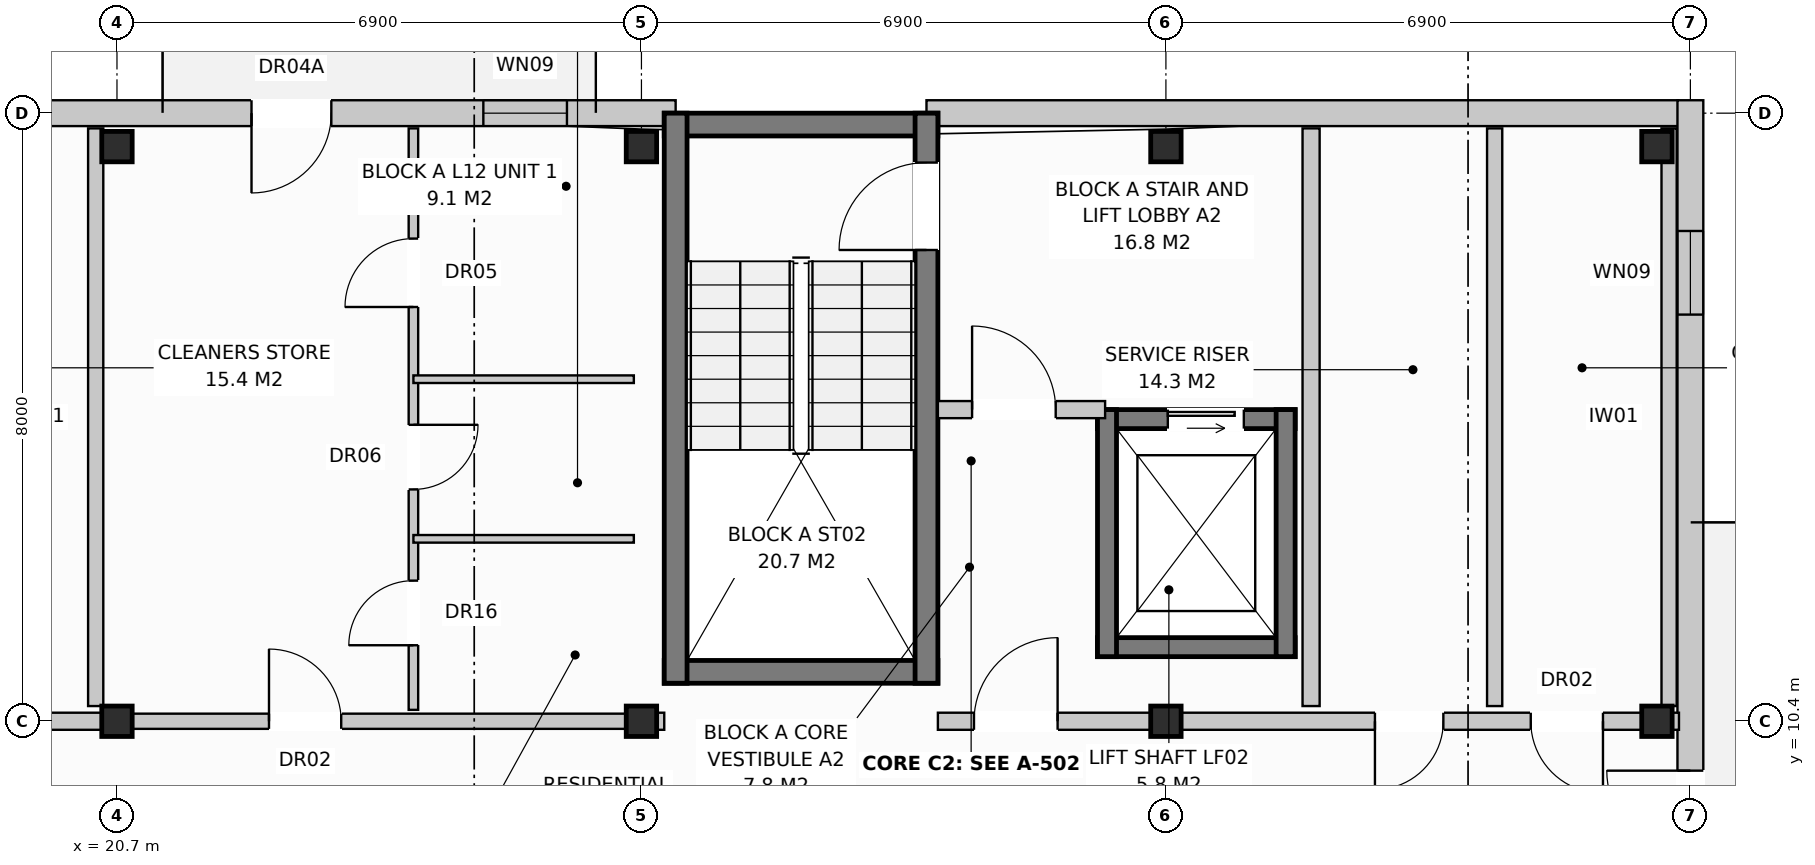
"""IFC4 building model, lengths in metres.
Left out: names, types, materials, properties, quantities, classifications, styles, units other than length and angle.
Written with IfcOpenShell. Run it as: python <this file> out.ifc"""

import sys

from ifc_helpers import new_model, si_unit, direction, frame, frame_2d, origin, origin_with_axes, origin_2d, place, context, subcontext, project, spatial, rectangle, extrude, element, fill, save


model = new_model("IFC4")
c1 = context("Model", 3, precision=1e-05, world=origin(), true_north=direction((0.0, 1.0)))
c2 = subcontext(c1, "Body", "Model", "MODEL_VIEW")
j1 = project(units=[si_unit("LENGTHUNIT", "METRE"), si_unit("PLANEANGLEUNIT", "RADIAN")], contexts=[c1])
p1 = place(None, origin())
s1 = spatial("IfcSite", under=j1, at=p1, CompositionType="ELEMENT")
p2 = place(p1, origin())
s2 = spatial("IfcBuilding", under=s1, at=p2, CompositionType="ELEMENT")
p3 = place(p2, frame((0.0, 0.0, 40.0)))
s3 = spatial("IfcBuildingStorey", under=s2, at=p3, CompositionType="ELEMENT", Elevation=40.0)
for number, where, z_axis, x_axis in (
    (1, (20.7, 10.4, 0.0), (0.0, 0.0, 1.0), (1.0, 0.0, 0.0)),
    (2, (20.7, 17.96, 0.0), (0.0, 0.0, 1.0), (1.0, 0.0, 0.0)),
    (3, (27.6, 10.4, 0.0), (0.0, 0.0, 1.0), (1.0, 0.0, 0.0)),
    (4, (27.6, 17.96, 0.0), (0.0, 0.0, 1.0), (1.0, 0.0, 0.0)),
    (5, (34.5, 10.4, 0.0), (0.0, 0.0, 1.0), (1.0, 0.0, 0.0)),
    (6, (34.5, 17.96, 0.0), (0.0, 0.0, 1.0), (1.0, 0.0, 0.0)),
    (7, (40.96, 10.4, 0.0), (0.0, 0.0, 1.0), (1.0, 0.0, 0.0)),
    (8, (40.96, 17.96, 0.0), (0.0, 0.0, 1.0), (1.0, 0.0, 0.0)),
):
    element("IfcColumn", number, at=place(p3, frame(where, z_axis=z_axis, x_axis=x_axis)), inside=s3, PredefinedType="COLUMN", context=c2, shape_type="SweptSolid", body=[
        extrude(rectangle(XDim=0.4, YDim=0.4, at=origin_2d()), origin(), (0.0, 0.0, 1.0), 3.2),
    ])
p4 = place(p3, frame((10.65, 18.4, 0.0), z_axis=(0.0, 0.0, 1.0), x_axis=(1.0, 0.0, 0.0)))
e9 = element("IfcWall", 9, at=p4, inside=s3, PredefinedType="STANDARD", context=c2, shape_type="SweptSolid", body=[
    extrude(rectangle(XDim=17.4, YDim=0.34, at=frame_2d((8.7, 0.0))), origin(), (0.0, 0.0, 1.0), 2.97),
])
p5 = place(p4, frame((11.82, 0.0, 0.0)))
e10 = element("IfcOpeningElement", 10, at=p5, cuts=e9, PredefinedType="OPENING", context=c2, shape_type="SweptSolid", body=[
    extrude(rectangle(XDim=1.05, YDim=2.12, at=frame_2d((0.525, 1.06))), frame((0.0, 0.182, 0.0), z_axis=(0.0, -1.0, 0.0), x_axis=(1.0, 0.0, 0.0)), (0.0, 0.0, 1.0), 0.364),
])
p6 = place(p4, frame((14.87, 0.0, 0.72)))
e11 = element("IfcOpeningElement", 11, at=p6, cuts=e9, PredefinedType="OPENING", context=c2, shape_type="SweptSolid", body=[
    extrude(rectangle(XDim=1.1, YDim=1.5, at=frame_2d((0.55, 0.75))), frame((0.0, 0.182, 0.0), z_axis=(0.0, -1.0, 0.0), x_axis=(1.0, 0.0, 0.0)), (0.0, 0.0, 1.0), 0.364),
])
p7 = place(p3, frame((31.35, 18.4, 0.0), z_axis=(0.0, 0.0, 1.0), x_axis=(1.0, 0.0, 0.0)))
e12 = element("IfcWall", 12, at=p7, inside=s3, PredefinedType="STANDARD", context=c2, shape_type="SweptSolid", body=[
    extrude(rectangle(XDim=9.89, YDim=0.34, at=frame_2d((4.945, 0.0))), origin(), (0.0, 0.0, 1.0), 2.97),
])
p8 = place(p3, frame((41.4, -0.17, 0.0), z_axis=(0.0, 0.0, 1.0), x_axis=(0.0, 1.0, 0.0)))
e13 = element("IfcWall", 13, at=p8, inside=s3, PredefinedType="STANDARD", context=c2, shape_type="SweptSolid", body=[
    extrude(rectangle(XDim=18.74, YDim=0.34, at=frame_2d((9.37, 0.0))), origin(), (0.0, 0.0, 1.0), 2.97),
])
p9 = place(p8, frame((8.82, 0.0, 0.0)))
e14 = element("IfcOpeningElement", 14, at=p9, cuts=e13, PredefinedType="OPENING", context=c2, shape_type="SweptSolid", body=[
    extrude(rectangle(XDim=1.1, YDim=2.1, at=frame_2d((0.55, 1.05))), frame((0.0, 0.182, 0.0), z_axis=(0.0, -1.0, 0.0), x_axis=(1.0, 0.0, 0.0)), (0.0, 0.0, 1.0), 0.364),
])
p10 = place(p8, frame((1.72, 0.0, 0.72)))
e15 = element("IfcOpeningElement", 15, at=p10, cuts=e13, PredefinedType="OPENING", context=c2, shape_type="SweptSolid", body=[
    extrude(rectangle(XDim=1.1, YDim=1.5, at=frame_2d((0.55, 0.75))), frame((0.0, 0.182, 0.0), z_axis=(0.0, -1.0, 0.0), x_axis=(1.0, 0.0, 0.0)), (0.0, 0.0, 1.0), 0.364),
])
p11 = place(p8, frame((15.92, 0.0, 0.72)))
e16 = element("IfcOpeningElement", 16, at=p11, cuts=e13, PredefinedType="OPENING", context=c2, shape_type="SweptSolid", body=[
    extrude(rectangle(XDim=1.1, YDim=1.5, at=frame_2d((0.55, 0.75))), frame((0.0, 0.182, 0.0), z_axis=(0.0, -1.0, 0.0), x_axis=(1.0, 0.0, 0.0)), (0.0, 0.0, 1.0), 0.364),
])
p12 = place(p3, frame((20.42, 10.6, 0.0), z_axis=(0.0, 0.0, 1.0), x_axis=(0.0, 1.0, 0.0)))
e17 = element("IfcWall", 17, at=p12, inside=s3, PredefinedType="PARTITIONING", context=c2, shape_type="SweptSolid", body=[
    extrude(rectangle(XDim=7.6, YDim=0.2, at=frame_2d((3.8, 0.0))), origin(), (0.0, 0.0, 1.0), 2.97),
])
p13 = place(p3, frame((10.8, 10.4, 0.0), z_axis=(0.0, 0.0, 1.0), x_axis=(1.0, 0.0, 0.0)))
e18 = element("IfcWall", 18, at=p13, inside=s3, PredefinedType="PARTITIONING", context=c2, shape_type="SweptSolid", body=[
    extrude(rectangle(XDim=9.9, YDim=0.225, at=frame_2d((4.95, 0.0))), origin(), (0.0, 0.0, 1.0), 2.41),
])
p14 = place(p13, frame((0.475, 0.0, 0.0)))
e19 = element("IfcOpeningElement", 19, at=p14, cuts=e18, PredefinedType="OPENING", context=c2, shape_type="SweptSolid", body=[
    extrude(rectangle(XDim=1.1, YDim=2.15, at=frame_2d((0.55, 1.075))), frame((0.0, 0.125, 0.0), z_axis=(0.0, -1.0, 0.0), x_axis=(1.0, 0.0, 0.0)), (0.0, 0.0, 1.0), 0.249),
])
p15 = place(p13, frame((5.75, 0.0, 0.0)))
e20 = element("IfcOpeningElement", 20, at=p15, cuts=e18, PredefinedType="OPENING", context=c2, shape_type="SweptSolid", body=[
    extrude(rectangle(XDim=0.9, YDim=2.1, at=frame_2d((0.45, 1.05))), frame((0.0, 0.125, 0.0), z_axis=(0.0, -1.0, 0.0), x_axis=(1.0, 0.0, 0.0)), (0.0, 0.0, 1.0), 0.249),
])
p16 = place(p13, frame((7.8, 0.0, 0.0)))
e21 = element("IfcOpeningElement", 21, at=p16, cuts=e18, PredefinedType="OPENING", context=c2, shape_type="SweptSolid", body=[
    extrude(rectangle(XDim=0.95, YDim=2.15, at=frame_2d((0.475, 1.075))), frame((0.0, 0.125, 0.0), z_axis=(0.0, -1.0, 0.0), x_axis=(1.0, 0.0, 0.0)), (0.0, 0.0, 1.0), 0.249),
])
for number, where, z_axis, x_axis in (
    (22, (27.9, 18.25, 0.0), (0.0, 0.0, 1.0), (1.0, 0.0, 0.0)),
    (23, (27.9, 11.05, 0.0), (0.0, 0.0, 1.0), (1.0, 0.0, 0.0)),
):
    element("IfcWall", number, at=place(p3, frame(where, z_axis=z_axis, x_axis=x_axis)), inside=s3, PredefinedType="SHEAR", context=c2, shape_type="SweptSolid", body=[
        extrude(rectangle(XDim=3.6, YDim=0.3, at=frame_2d((1.8, 0.0))), origin(), (0.0, 0.0, 1.0), 2.97),
    ])
p17 = place(p3, frame((28.05, 10.9, 0.0), z_axis=(0.0, 0.0, 1.0), x_axis=(0.0, 1.0, 0.0)))
e24 = element("IfcWall", 24, at=p17, inside=s3, PredefinedType="SHEAR", context=c2, shape_type="SweptSolid", body=[
    extrude(rectangle(XDim=7.5, YDim=0.3, at=frame_2d((3.75, 0.0))), origin(), (0.0, 0.0, 1.0), 2.97),
])
p18 = place(p3, frame((31.35, 10.9, 0.0), z_axis=(0.0, 0.0, 1.0), x_axis=(0.0, 1.0, 0.0)))
e25 = element("IfcWall", 25, at=p18, inside=s3, PredefinedType="SHEAR", context=c2, shape_type="SweptSolid", body=[
    extrude(rectangle(XDim=7.5, YDim=0.3, at=frame_2d((3.75, 0.0))), origin(), (0.0, 0.0, 1.0), 2.97),
])
p19 = place(p18, frame((5.7, 0.0, 0.0)))
e26 = element("IfcOpeningElement", 26, at=p19, cuts=e25, PredefinedType="OPENING", context=c2, shape_type="SweptSolid", body=[
    extrude(rectangle(XDim=1.15, YDim=2.15, at=frame_2d((0.575, 1.075))), frame((0.0, 0.162, 0.0), z_axis=(0.0, -1.0, 0.0), x_axis=(1.0, 0.0, 0.0)), (0.0, 0.0, 1.0), 0.324),
])
p20 = place(p3, frame((33.6, 14.375, 0.0), z_axis=(0.0, 0.0, 1.0), x_axis=(1.0, 0.0, 0.0)))
e27 = element("IfcWall", 27, at=p20, inside=s3, PredefinedType="SHEAR", context=c2, shape_type="SweptSolid", body=[
    extrude(rectangle(XDim=2.6, YDim=0.25, at=frame_2d((1.3, 0.0))), origin(), (0.0, 0.0, 1.0), 2.97),
])
p21 = place(p20, frame((0.925, 0.0, 0.0)))
e28 = element("IfcOpeningElement", 28, at=p21, cuts=e27, PredefinedType="OPENING", context=c2, shape_type="SweptSolid", body=[
    extrude(rectangle(XDim=1.0, YDim=2.1, at=frame_2d((0.5, 1.05))), frame((0.0, 0.137, 0.0), z_axis=(0.0, -1.0, 0.0), x_axis=(1.0, 0.0, 0.0)), (0.0, 0.0, 1.0), 0.274),
])
p22 = place(p3, frame((33.6, 11.375, 0.0), z_axis=(0.0, 0.0, 1.0), x_axis=(1.0, 0.0, 0.0)))
e29 = element("IfcWall", 29, at=p22, inside=s3, PredefinedType="SHEAR", context=c2, shape_type="SweptSolid", body=[
    extrude(rectangle(XDim=2.6, YDim=0.25, at=frame_2d((1.3, 0.0))), origin(), (0.0, 0.0, 1.0), 2.97),
])
for number, where, z_axis, x_axis in (
    (30, (33.725, 11.25, 0.0), (0.0, 0.0, 1.0), (0.0, 1.0, 0.0)),
    (31, (36.075, 11.25, 0.0), (0.0, 0.0, 1.0), (0.0, 1.0, 0.0)),
):
    element("IfcWall", number, at=place(p3, frame(where, z_axis=z_axis, x_axis=x_axis)), inside=s3, PredefinedType="SHEAR", context=c2, shape_type="SweptSolid", body=[
        extrude(rectangle(XDim=3.25, YDim=0.25, at=frame_2d((1.625, 0.0))), origin(), (0.0, 0.0, 1.0), 2.97),
    ])
p23 = place(p3, frame((36.41, 10.6, 0.0), z_axis=(0.0, 0.0, 1.0), x_axis=(0.0, 1.0, 0.0)))
e32 = element("IfcWall", 32, at=p23, inside=s3, PredefinedType="PARTITIONING", context=c2, shape_type="SweptSolid", body=[
    extrude(rectangle(XDim=7.6, YDim=0.225, at=frame_2d((3.8, 0.0))), origin(), (0.0, 0.0, 1.0), 2.59),
])
p24 = place(p3, frame((31.5, 14.5, 0.0), z_axis=(0.0, 0.0, 1.0), x_axis=(1.0, 0.0, 0.0)))
e33 = element("IfcWall", 33, at=p24, inside=s3, PredefinedType="PARTITIONING", context=c2, shape_type="SweptSolid", body=[
    extrude(rectangle(XDim=2.2, YDim=0.225, at=frame_2d((1.1, 0.0))), origin(), (0.0, 0.0, 1.0), 2.97),
])
p25 = place(p24, frame((0.45, 0.0, 0.0)))
e34 = element("IfcOpeningElement", 34, at=p25, cuts=e33, PredefinedType="OPENING", context=c2, shape_type="SweptSolid", body=[
    extrude(rectangle(XDim=1.1, YDim=2.15, at=frame_2d((0.55, 1.075))), frame((0.0, 0.125, 0.0), z_axis=(0.0, -1.0, 0.0), x_axis=(1.0, 0.0, 0.0)), (0.0, 0.0, 1.0), 0.249),
])
p26 = place(p3, frame((27.6, 10.4, 0.0), z_axis=(0.0, 0.0, 1.0), x_axis=(1.0, 0.0, 0.0)))
e35 = element("IfcWall", 35, at=p26, inside=s3, PredefinedType="PARTITIONING", context=c2, shape_type="SweptSolid", body=[
    extrude(rectangle(XDim=0.3, YDim=0.225, at=frame_2d((0.15, 0.0))), origin(), (0.0, 0.0, 1.0), 2.97),
])
p27 = place(p3, frame((38.825, 10.6, 0.0), z_axis=(0.0, 0.0, 1.0), x_axis=(0.0, 1.0, 0.0)))
e36 = element("IfcWall", 36, at=p27, inside=s3, PredefinedType="PARTITIONING", context=c2, shape_type="SweptSolid", body=[
    extrude(rectangle(XDim=7.6, YDim=0.2, at=frame_2d((3.8, 0.0))), origin(), (0.0, 0.0, 1.0), 2.97),
])
p28 = place(p3, frame((41.12, 10.6, 0.0), z_axis=(0.0, 0.0, 1.0), x_axis=(0.0, 1.0, 0.0)))
e37 = element("IfcWall", 37, at=p28, inside=s3, PredefinedType="PARTITIONING", context=c2, shape_type="SweptSolid", body=[
    extrude(rectangle(XDim=7.6, YDim=0.2, at=frame_2d((3.8, 0.0))), origin(), (0.0, 0.0, 1.0), 2.41),
])
p29 = place(p3, frame((31.5, 10.4, 0.0), z_axis=(0.0, 0.0, 1.0), x_axis=(1.0, 0.0, 0.0)))
e38 = element("IfcWall", 38, at=p29, inside=s3, PredefinedType="PARTITIONING", context=c2, shape_type="SweptSolid", body=[
    extrude(rectangle(XDim=9.75, YDim=0.225, at=frame_2d((4.875, 0.0))), origin(), (0.0, 0.0, 1.0), 2.41),
])
p30 = place(p29, frame((0.475, 0.0, 0.0)))
e39 = element("IfcOpeningElement", 39, at=p30, cuts=e38, PredefinedType="OPENING", context=c2, shape_type="SweptSolid", body=[
    extrude(rectangle(XDim=1.1, YDim=2.15, at=frame_2d((0.55, 1.075))), frame((0.0, 0.125, 0.0), z_axis=(0.0, -1.0, 0.0), x_axis=(1.0, 0.0, 0.0)), (0.0, 0.0, 1.0), 0.249),
])
p31 = place(p29, frame((5.75, 0.0, 0.0)))
e40 = element("IfcOpeningElement", 40, at=p31, cuts=e38, PredefinedType="OPENING", context=c2, shape_type="SweptSolid", body=[
    extrude(rectangle(XDim=0.9, YDim=2.1, at=frame_2d((0.45, 1.05))), frame((0.0, 0.125, 0.0), z_axis=(0.0, -1.0, 0.0), x_axis=(1.0, 0.0, 0.0)), (0.0, 0.0, 1.0), 0.249),
])
p32 = place(p29, frame((7.8, 0.0, 0.0)))
e41 = element("IfcOpeningElement", 41, at=p32, cuts=e38, PredefinedType="OPENING", context=c2, shape_type="SweptSolid", body=[
    extrude(rectangle(XDim=0.95, YDim=2.15, at=frame_2d((0.475, 1.075))), frame((0.0, 0.125, 0.0), z_axis=(0.0, -1.0, 0.0), x_axis=(1.0, 0.0, 0.0)), (0.0, 0.0, 1.0), 0.249),
])
p33 = place(p3, frame((20.7, 10.4, 0.0), z_axis=(0.0, 0.0, 1.0), x_axis=(1.0, 0.0, 0.0)))
e42 = element("IfcWall", 42, at=p33, inside=s3, PredefinedType="PARTITIONING", context=c2, shape_type="SweptSolid", body=[
    extrude(rectangle(XDim=6.9, YDim=0.2, at=frame_2d((3.45, 0.0))), origin(), (0.0, 0.0, 1.0), 2.41),
])
p34 = place(p33, frame((2.0, 0.0, 0.0)))
e43 = element("IfcOpeningElement", 43, at=p34, cuts=e42, PredefinedType="OPENING", context=c2, shape_type="SweptSolid", body=[
    extrude(rectangle(XDim=0.95, YDim=2.15, at=frame_2d((0.475, 1.075))), frame((0.0, 0.112, 0.0), z_axis=(0.0, -1.0, 0.0), x_axis=(1.0, 0.0, 0.0)), (0.0, 0.0, 1.0), 0.224),
])
p35 = place(p3, frame((24.6, 10.55, 0.0), z_axis=(0.0, 0.0, 1.0), x_axis=(0.0, 1.0, 0.0)))
e44 = element("IfcWall", 44, at=p35, inside=s3, PredefinedType="PARTITIONING", context=c2, shape_type="SweptSolid", body=[
    extrude(rectangle(XDim=7.65, YDim=0.125, at=frame_2d((3.825, 0.0))), origin(), (0.0, 0.0, 1.0), 2.97),
])
p36 = place(p35, frame((0.85, 0.0, 0.0)))
e45 = element("IfcOpeningElement", 45, at=p36, cuts=e44, PredefinedType="OPENING", context=c2, shape_type="SweptSolid", body=[
    extrude(rectangle(XDim=0.85, YDim=2.1, at=frame_2d((0.425, 1.05))), frame((0.0, 0.074, 0.0), z_axis=(0.0, -1.0, 0.0), x_axis=(1.0, 0.0, 0.0)), (0.0, 0.0, 1.0), 0.149),
])
p37 = place(p35, frame((2.9, 0.0, 0.0)))
e46 = element("IfcOpeningElement", 46, at=p37, cuts=e44, PredefinedType="OPENING", context=c2, shape_type="SweptSolid", body=[
    extrude(rectangle(XDim=0.85, YDim=2.05, at=frame_2d((0.425, 1.025))), frame((0.0, 0.074, 0.0), z_axis=(0.0, -1.0, 0.0), x_axis=(1.0, 0.0, 0.0)), (0.0, 0.0, 1.0), 0.149),
])
p38 = place(p35, frame((5.3, 0.0, 0.0)))
e47 = element("IfcOpeningElement", 47, at=p38, cuts=e44, PredefinedType="OPENING", context=c2, shape_type="SweptSolid", body=[
    extrude(rectangle(XDim=0.9, YDim=2.1, at=frame_2d((0.45, 1.05))), frame((0.0, 0.074, 0.0), z_axis=(0.0, -1.0, 0.0), x_axis=(1.0, 0.0, 0.0)), (0.0, 0.0, 1.0), 0.149),
])
for number, where, z_axis, x_axis in (
    (48, (24.6, 12.8, 0.0), (0.0, 0.0, 1.0), (1.0, 0.0, 0.0)),
    (49, (24.6, 14.9, 0.0), (0.0, 0.0, 1.0), (1.0, 0.0, 0.0)),
):
    element("IfcWall", number, at=place(p3, frame(where, z_axis=z_axis, x_axis=x_axis)), inside=s3, PredefinedType="PARTITIONING", context=c2, shape_type="SweptSolid", body=[
        extrude(rectangle(XDim=2.9, YDim=0.1, at=frame_2d((1.45, 0.0))), origin(), (0.0, 0.0, 1.0), 2.97),
    ])
p39 = place(p5, frame((1.05, 0.0, 0.0), z_axis=(0.0, 0.0, 1.0), x_axis=(-1.0, 0.0, 0.0)))
e50 = element("IfcDoor", 50, at=p39, inside=s3, OperationType="SINGLE_SWING_LEFT", PredefinedType="DOOR", context=c2, shape_type="SweptSolid", body=[
    extrude(rectangle(XDim=1.05, YDim=2.12, at=frame_2d((0.525, 1.06))), frame((0.0, 0.025, 0.0), z_axis=(0.0, -1.0, 0.0), x_axis=(1.0, 0.0, 0.0)), (0.0, 0.0, 1.0), 0.05),
])
fill(e10, e50)
p40 = place(p6, origin_with_axes())
e51 = element("IfcWindow", 51, at=p40, inside=s3, PartitioningType="SINGLE_PANEL", PredefinedType="WINDOW", context=c2, shape_type="SweptSolid", body=[
    extrude(rectangle(XDim=1.1, YDim=1.5, at=frame_2d((0.55, 0.75))), frame((0.0, 0.03, 0.0), z_axis=(0.0, -1.0, 0.0), x_axis=(1.0, 0.0, 0.0)), (0.0, 0.0, 1.0), 0.06),
])
fill(e11, e51)
p41 = place(p9, origin_with_axes())
e52 = element("IfcDoor", 52, at=p41, inside=s3, OperationType="SINGLE_SWING_RIGHT", PredefinedType="DOOR", context=c2, shape_type="SweptSolid", body=[
    extrude(rectangle(XDim=1.1, YDim=2.1, at=frame_2d((0.55, 1.05))), frame((0.0, 0.025, 0.0), z_axis=(0.0, -1.0, 0.0), x_axis=(1.0, 0.0, 0.0)), (0.0, 0.0, 1.0), 0.05),
])
fill(e14, e52)
p42 = place(p11, origin_with_axes())
e53 = element("IfcWindow", 53, at=p42, inside=s3, PartitioningType="SINGLE_PANEL", PredefinedType="WINDOW", context=c2, shape_type="SweptSolid", body=[
    extrude(rectangle(XDim=1.1, YDim=1.5, at=frame_2d((0.55, 0.75))), frame((0.0, 0.03, 0.0), z_axis=(0.0, -1.0, 0.0), x_axis=(1.0, 0.0, 0.0)), (0.0, 0.0, 1.0), 0.06),
])
fill(e16, e53)
p43 = place(p19, origin_with_axes())
e54 = element("IfcDoor", 54, at=p43, inside=s3, OperationType="SINGLE_SWING_LEFT", PredefinedType="DOOR", context=c2, shape_type="SweptSolid", body=[
    extrude(rectangle(XDim=1.15, YDim=2.15, at=frame_2d((0.575, 1.075))), frame((0.0, 0.025, 0.0), z_axis=(0.0, -1.0, 0.0), x_axis=(1.0, 0.0, 0.0)), (0.0, 0.0, 1.0), 0.05),
])
fill(e26, e54)
p44 = place(p21, origin_with_axes())
e55 = element("IfcDoor", 55, at=p44, inside=s3, OperationType="SLIDING_TO_LEFT", PredefinedType="DOOR", context=c2, shape_type="SweptSolid", body=[
    extrude(rectangle(XDim=1.0, YDim=2.1, at=frame_2d((0.5, 1.05))), frame((0.0, 0.025, 0.0), z_axis=(0.0, -1.0, 0.0), x_axis=(1.0, 0.0, 0.0)), (0.0, 0.0, 1.0), 0.05),
])
fill(e28, e55)
p45 = place(p25, origin_with_axes())
e56 = element("IfcDoor", 56, at=p45, inside=s3, OperationType="SINGLE_SWING_LEFT", PredefinedType="DOOR", context=c2, shape_type="SweptSolid", body=[
    extrude(rectangle(XDim=1.1, YDim=2.15, at=frame_2d((0.55, 1.075))), frame((0.0, 0.025, 0.0), z_axis=(0.0, -1.0, 0.0), x_axis=(1.0, 0.0, 0.0)), (0.0, 0.0, 1.0), 0.05),
])
fill(e34, e56)
p46 = place(p30, origin_with_axes())
e57 = element("IfcDoor", 57, at=p46, inside=s3, OperationType="SINGLE_SWING_RIGHT", PredefinedType="DOOR", context=c2, shape_type="SweptSolid", body=[
    extrude(rectangle(XDim=1.1, YDim=2.15, at=frame_2d((0.55, 1.075))), frame((0.0, 0.025, 0.0), z_axis=(0.0, -1.0, 0.0), x_axis=(1.0, 0.0, 0.0)), (0.0, 0.0, 1.0), 0.05),
])
fill(e39, e57)
p47 = place(p31, frame((0.9, 0.0, 0.0), z_axis=(0.0, 0.0, 1.0), x_axis=(-1.0, 0.0, 0.0)))
e58 = element("IfcDoor", 58, at=p47, inside=s3, OperationType="SINGLE_SWING_LEFT", PredefinedType="DOOR", context=c2, shape_type="SweptSolid", body=[
    extrude(rectangle(XDim=0.9, YDim=2.1, at=frame_2d((0.45, 1.05))), frame((0.0, 0.025, 0.0), z_axis=(0.0, -1.0, 0.0), x_axis=(1.0, 0.0, 0.0)), (0.0, 0.0, 1.0), 0.05),
])
fill(e40, e58)
p48 = place(p32, frame((0.95, 0.0, 0.0), z_axis=(0.0, 0.0, 1.0), x_axis=(-1.0, 0.0, 0.0)))
e59 = element("IfcDoor", 59, at=p48, inside=s3, OperationType="SINGLE_SWING_RIGHT", PredefinedType="DOOR", context=c2, shape_type="SweptSolid", body=[
    extrude(rectangle(XDim=0.95, YDim=2.15, at=frame_2d((0.475, 1.075))), frame((0.0, 0.025, 0.0), z_axis=(0.0, -1.0, 0.0), x_axis=(1.0, 0.0, 0.0)), (0.0, 0.0, 1.0), 0.05),
])
fill(e41, e59)
p49 = place(p34, origin_with_axes())
e60 = element("IfcDoor", 60, at=p49, inside=s3, OperationType="SINGLE_SWING_LEFT", PredefinedType="DOOR", context=c2, shape_type="SweptSolid", body=[
    extrude(rectangle(XDim=0.95, YDim=2.15, at=frame_2d((0.475, 1.075))), frame((0.0, 0.025, 0.0), z_axis=(0.0, -1.0, 0.0), x_axis=(1.0, 0.0, 0.0)), (0.0, 0.0, 1.0), 0.05),
])
fill(e43, e60)
p50 = place(p36, origin_with_axes())
e61 = element("IfcDoor", 61, at=p50, inside=s3, OperationType="SINGLE_SWING_LEFT", PredefinedType="DOOR", context=c2, shape_type="SweptSolid", body=[
    extrude(rectangle(XDim=0.85, YDim=2.1, at=frame_2d((0.425, 1.05))), frame((0.0, 0.025, 0.0), z_axis=(0.0, -1.0, 0.0), x_axis=(1.0, 0.0, 0.0)), (0.0, 0.0, 1.0), 0.05),
])
fill(e45, e61)
p51 = place(p37, frame((0.85, 0.0, 0.0), z_axis=(0.0, 0.0, 1.0), x_axis=(-1.0, 0.0, 0.0)))
e62 = element("IfcDoor", 62, at=p51, inside=s3, OperationType="SINGLE_SWING_RIGHT", PredefinedType="DOOR", context=c2, shape_type="SweptSolid", body=[
    extrude(rectangle(XDim=0.85, YDim=2.05, at=frame_2d((0.425, 1.025))), frame((0.0, 0.025, 0.0), z_axis=(0.0, -1.0, 0.0), x_axis=(1.0, 0.0, 0.0)), (0.0, 0.0, 1.0), 0.05),
])
fill(e46, e62)
p52 = place(p38, origin_with_axes())
e63 = element("IfcDoor", 63, at=p52, inside=s3, OperationType="SINGLE_SWING_LEFT", PredefinedType="DOOR", context=c2, shape_type="SweptSolid", body=[
    extrude(rectangle(XDim=0.9, YDim=2.1, at=frame_2d((0.45, 1.05))), frame((0.0, 0.025, 0.0), z_axis=(0.0, -1.0, 0.0), x_axis=(1.0, 0.0, 0.0)), (0.0, 0.0, 1.0), 0.05),
])
fill(e47, e63)
save(model, sys.argv[1])
